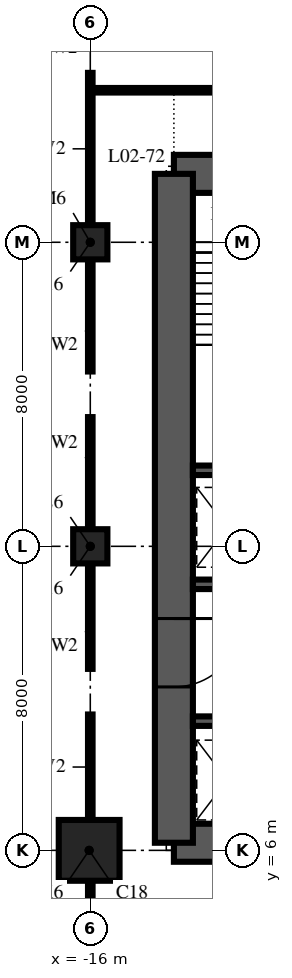
"""IFC4 building model, lengths in metres.
Left out: names, types, materials, properties, quantities, classifications, styles, units other than length and angle.
Written with IfcOpenShell. Run it as: python <this file> out.ifc"""

import sys

from ifc_helpers import new_model, si_unit, direction, frame, frame_2d, origin, origin_2d, place, context, subcontext, project, spatial, polyline, rectangle, outline, extrude, element, fill, save


model = new_model("IFC4")
c1 = context("Model", 3, precision=1e-05, world=origin(), true_north=direction((0.0, 1.0)))
c2 = subcontext(c1, "Body", "Model", "MODEL_VIEW")
j1 = project(units=[si_unit("LENGTHUNIT", "METRE"), si_unit("PLANEANGLEUNIT", "RADIAN")], contexts=[c1])
p1 = place(None, origin())
s1 = spatial("IfcSite", under=j1, at=p1, CompositionType="ELEMENT")
p2 = place(p1, origin())
s2 = spatial("IfcBuilding", under=s1, at=p2, CompositionType="ELEMENT")
p3 = place(p2, frame((0.0, 0.0, 12.0)))
s3 = spatial("IfcBuildingStorey", under=s2, at=p3, CompositionType="ELEMENT", Elevation=12.0)
p4 = place(p3, frame((-16.03, 6.0, 0.0), z_axis=(0.0, 0.0, 1.0), x_axis=(1.0, 0.0, 0.0)))
e1 = element("IfcColumn", 1, at=p4, inside=s3, PredefinedType="COLUMN", context=c2, shape_type="SweptSolid", body=[
    extrude(rectangle(XDim=1.6, YDim=1.6, at=origin_2d()), origin(), (0.0, 0.0, 1.0), 7.0),
])
for number, where, z_axis, x_axis in (
    (2, (-16.0, 14.0, 0.0), (0.0, 0.0, 1.0), (1.0, 0.0, 0.0)),
    (3, (-16.0, 22.0, 0.0), (0.0, 0.0, 1.0), (1.0, 0.0, 0.0)),
):
    element("IfcColumn", number, at=place(p3, frame(where, z_axis=z_axis, x_axis=x_axis)), inside=s3, PredefinedType="COLUMN", context=c2, shape_type="SweptSolid", body=[
        extrude(rectangle(XDim=0.9, YDim=0.9, at=origin_2d()), origin(), (0.0, 0.0, 1.0), 7.0),
    ])
p5 = place(p3, frame((-13.8, 6.2, 0.0), z_axis=(0.0, 0.0, 1.0), x_axis=(1.0, 0.0, 0.0)))
e4 = element("IfcWall", 4, at=p5, inside=s3, PredefinedType="SHEAR", context=c2, shape_type="SweptSolid", body=[
    extrude(rectangle(XDim=27.6, YDim=1.0, at=frame_2d((13.8, 0.0))), origin(), (0.0, 0.0, 1.0), 7.0),
])
p6 = place(p3, frame((13.8, 23.8, 0.0), z_axis=(0.0, 0.0, 1.0), x_axis=(-1.0, 0.0, 0.0)))
e5 = element("IfcWall", 5, at=p6, inside=s3, PredefinedType="SHEAR", context=c2, shape_type="SweptSolid", body=[
    extrude(rectangle(XDim=27.6, YDim=1.0, at=frame_2d((13.8, 0.0))), origin(), (0.0, 0.0, 1.0), 7.0),
])
p7 = place(p6, frame((21.7, 0.0, 0.0)))
e6 = element("IfcOpeningElement", 6, at=p7, cuts=e5, PredefinedType="OPENING", context=c2, shape_type="SweptSolid", body=[
    extrude(rectangle(XDim=1.0, YDim=2.1, at=frame_2d((0.5, 1.05))), frame((0.0, 0.515, 0.0), z_axis=(0.0, -1.0, 0.0), x_axis=(1.0, 0.0, 0.0)), (0.0, 0.0, 1.0), 1.03),
])
p8 = place(p6, frame((4.9, 0.0, 0.0)))
e7 = element("IfcOpeningElement", 7, at=p8, cuts=e5, PredefinedType="OPENING", context=c2, shape_type="SweptSolid", body=[
    extrude(rectangle(XDim=1.0, YDim=2.1, at=frame_2d((0.5, 1.05))), frame((0.0, 0.515, 0.0), z_axis=(0.0, -1.0, 0.0), x_axis=(1.0, 0.0, 0.0)), (0.0, 0.0, 1.0), 1.03),
])
p9 = place(p6, frame((17.3, 0.0, 0.0)))
e8 = element("IfcOpeningElement", 8, at=p9, cuts=e5, PredefinedType="OPENING", context=c2, shape_type="SweptSolid", body=[
    extrude(rectangle(XDim=1.0, YDim=2.1, at=frame_2d((0.5, 1.05))), frame((0.0, 0.515, 0.0), z_axis=(0.0, -1.0, 0.0), x_axis=(1.0, 0.0, 0.0)), (0.0, 0.0, 1.0), 1.03),
])
p10 = place(p6, frame((13.3, 0.0, 0.0)))
e9 = element("IfcOpeningElement", 9, at=p10, cuts=e5, PredefinedType="OPENING", context=c2, shape_type="SweptSolid", body=[
    extrude(rectangle(XDim=1.0, YDim=2.1, at=frame_2d((0.5, 1.05))), frame((0.0, 0.515, 0.0), z_axis=(0.0, -1.0, 0.0), x_axis=(1.0, 0.0, 0.0)), (0.0, 0.0, 1.0), 1.03),
])
p11 = place(p6, frame((9.3, 0.0, 0.0)))
e10 = element("IfcOpeningElement", 10, at=p11, cuts=e5, PredefinedType="OPENING", context=c2, shape_type="SweptSolid", body=[
    extrude(rectangle(XDim=1.0, YDim=2.1, at=frame_2d((0.5, 1.05))), frame((0.0, 0.515, 0.0), z_axis=(0.0, -1.0, 0.0), x_axis=(1.0, 0.0, 0.0)), (0.0, 0.0, 1.0), 1.03),
])
p12 = place(p3, frame((-13.8, 23.8, 0.0), z_axis=(0.0, 0.0, 1.0), x_axis=(0.0, -1.0, 0.0)))
e11 = element("IfcWall", 11, at=p12, inside=s3, PredefinedType="SHEAR", context=c2, shape_type="SweptSolid", body=[
    extrude(outline(polyline([(0.0, -0.5), (17.6, -0.5), (17.6, 0.0), (17.1, 0.0), (17.1, 0.5), (0.5, 0.5), (0.5, 0.0), (0.0, 0.0), (0.0, -0.5)])), origin(), (0.0, 0.0, 1.0), 7.0),
])
p13 = place(p12, frame((11.7, 0.0, 0.0)))
e12 = element("IfcOpeningElement", 12, at=p13, cuts=e11, PredefinedType="OPENING", context=c2, shape_type="SweptSolid", body=[
    extrude(rectangle(XDim=1.8, YDim=2.4, at=frame_2d((0.9, 1.2))), frame((0.0, 0.515, 0.0), z_axis=(0.0, -1.0, 0.0), x_axis=(1.0, 0.0, 0.0)), (0.0, 0.0, 1.0), 1.03),
])
p14 = place(p3, frame((-13.3, 9.4, 0.0), z_axis=(0.0, 0.0, 1.0), x_axis=(1.0, 0.0, 0.0)))
e13 = element("IfcWall", 13, at=p14, inside=s3, PredefinedType="SHEAR", context=c2, shape_type="SweptSolid", body=[
    extrude(rectangle(XDim=26.6, YDim=0.25, at=frame_2d((13.3, 0.0))), origin(), (0.0, 0.0, 1.0), 7.0),
])
p15 = place(p3, frame((-13.3, 13.0, 0.0), z_axis=(0.0, 0.0, 1.0), x_axis=(1.0, 0.0, 0.0)))
e14 = element("IfcWall", 14, at=p15, inside=s3, PredefinedType="SHEAR", context=c2, shape_type="SweptSolid", body=[
    extrude(rectangle(XDim=26.6, YDim=0.25, at=frame_2d((13.3, 0.0))), origin(), (0.0, 0.0, 1.0), 7.0),
])
p16 = place(p15, frame((15.25, 0.0, 0.0)))
e15 = element("IfcOpeningElement", 15, at=p16, cuts=e14, PredefinedType="OPENING", context=c2, shape_type="SweptSolid", body=[
    extrude(rectangle(XDim=0.9, YDim=2.1, at=frame_2d((0.45, 1.05))), frame((0.0, 0.14, 0.0), z_axis=(0.0, -1.0, 0.0), x_axis=(1.0, 0.0, 0.0)), (0.0, 0.0, 1.0), 0.28),
])
p17 = place(p15, frame((17.65, 0.0, 0.0)))
e16 = element("IfcOpeningElement", 16, at=p17, cuts=e14, PredefinedType="OPENING", context=c2, shape_type="SweptSolid", body=[
    extrude(rectangle(XDim=0.9, YDim=2.1, at=frame_2d((0.45, 1.05))), frame((0.0, 0.14, 0.0), z_axis=(0.0, -1.0, 0.0), x_axis=(1.0, 0.0, 0.0)), (0.0, 0.0, 1.0), 0.28),
])
p18 = place(p15, frame((20.85, 0.0, 0.0)))
e17 = element("IfcOpeningElement", 17, at=p18, cuts=e14, PredefinedType="OPENING", context=c2, shape_type="SweptSolid", body=[
    extrude(rectangle(XDim=0.9, YDim=2.1, at=frame_2d((0.45, 1.05))), frame((0.0, 0.14, 0.0), z_axis=(0.0, -1.0, 0.0), x_axis=(1.0, 0.0, 0.0)), (0.0, 0.0, 1.0), 0.28),
])
p19 = place(p3, frame((-13.3, 16.0, 0.0), z_axis=(0.0, 0.0, 1.0), x_axis=(1.0, 0.0, 0.0)))
e18 = element("IfcWall", 18, at=p19, inside=s3, PredefinedType="SHEAR", context=c2, shape_type="SweptSolid", body=[
    extrude(rectangle(XDim=26.6, YDim=0.25, at=frame_2d((13.3, 0.0))), origin(), (0.0, 0.0, 1.0), 7.0),
])
for number, where, z_axis, x_axis in (
    (19, (-16.0, 2.425, 0.0), (0.0, 0.0, 1.0), (0.0, 1.0, 0.0)),
    (20, (-16.0, 6.81, 0.0), (0.0, 0.0, 1.0), (0.0, 1.0, 0.0)),
):
    element("IfcWall", number, at=place(p3, frame(where, z_axis=z_axis, x_axis=x_axis)), inside=s3, PredefinedType="PARTITIONING", context=c2, shape_type="SweptSolid", body=[
        extrude(rectangle(XDim=2.765, YDim=0.12, at=frame_2d((1.382, 0.0))), origin(), (0.0, 0.0, 1.0), 6.05),
    ])
p20 = place(p3, frame((-16.0, 10.775, 0.0), z_axis=(0.0, 0.0, 1.0), x_axis=(0.0, 1.0, 0.0)))
e21 = element("IfcWall", 21, at=p20, inside=s3, PredefinedType="PARTITIONING", context=c2, shape_type="SweptSolid", body=[
    extrude(rectangle(XDim=2.765, YDim=0.12, at=frame_2d((1.383, 0.0))), origin(), (0.0, 0.0, 1.0), 6.05),
])
for number, where, z_axis, x_axis in (
    (22, (-16.0, 14.46, 0.0), (0.0, 0.0, 1.0), (0.0, 1.0, 0.0)),
    (23, (-16.0, 18.6, 0.0), (0.0, 0.0, 1.0), (0.0, 1.0, 0.0)),
):
    element("IfcWall", number, at=place(p3, frame(where, z_axis=z_axis, x_axis=x_axis)), inside=s3, PredefinedType="PARTITIONING", context=c2, shape_type="SweptSolid", body=[
        extrude(rectangle(XDim=2.94, YDim=0.12, at=frame_2d((1.47, 0.0))), origin(), (0.0, 0.0, 1.0), 6.05),
    ])
p21 = place(p3, frame((-16.0, 22.46, 0.0), z_axis=(0.0, 0.0, 1.0), x_axis=(0.0, 1.0, 0.0)))
e24 = element("IfcWall", 24, at=p21, inside=s3, PredefinedType="PARTITIONING", context=c2, shape_type="SweptSolid", body=[
    extrude(rectangle(XDim=3.998, YDim=0.12, at=frame_2d((1.999, 0.0))), origin(), (0.0, 0.0, 1.0), 6.7),
])
p22 = place(p3, frame((-16.0, 26.0, 0.0), z_axis=(0.0, 0.0, 1.0), x_axis=(1.0, 0.0, 0.0)))
e25 = element("IfcWall", 25, at=p22, inside=s3, PredefinedType="PARTITIONING", context=c2, shape_type="SweptSolid", body=[
    extrude(rectangle(XDim=15.4, YDim=0.12, at=frame_2d((7.7, 0.0))), origin(), (0.0, 0.0, 1.0), 6.7),
])
p23 = place(p13, origin())
e26 = element("IfcDoor", 26, at=p23, inside=s3, OperationType="DOUBLE_DOOR_SINGLE_SWING", PredefinedType="DOOR", context=c2, shape_type="SweptSolid", body=[
    extrude(rectangle(XDim=1.8, YDim=2.4, at=frame_2d((0.9, 1.2))), frame((0.0, 0.5, 0.0), z_axis=(0.0, -1.0, 0.0), x_axis=(1.0, 0.0, 0.0)), (0.0, 0.0, 1.0), 1.0),
])
fill(e12, e26)
save(model, sys.argv[1])
